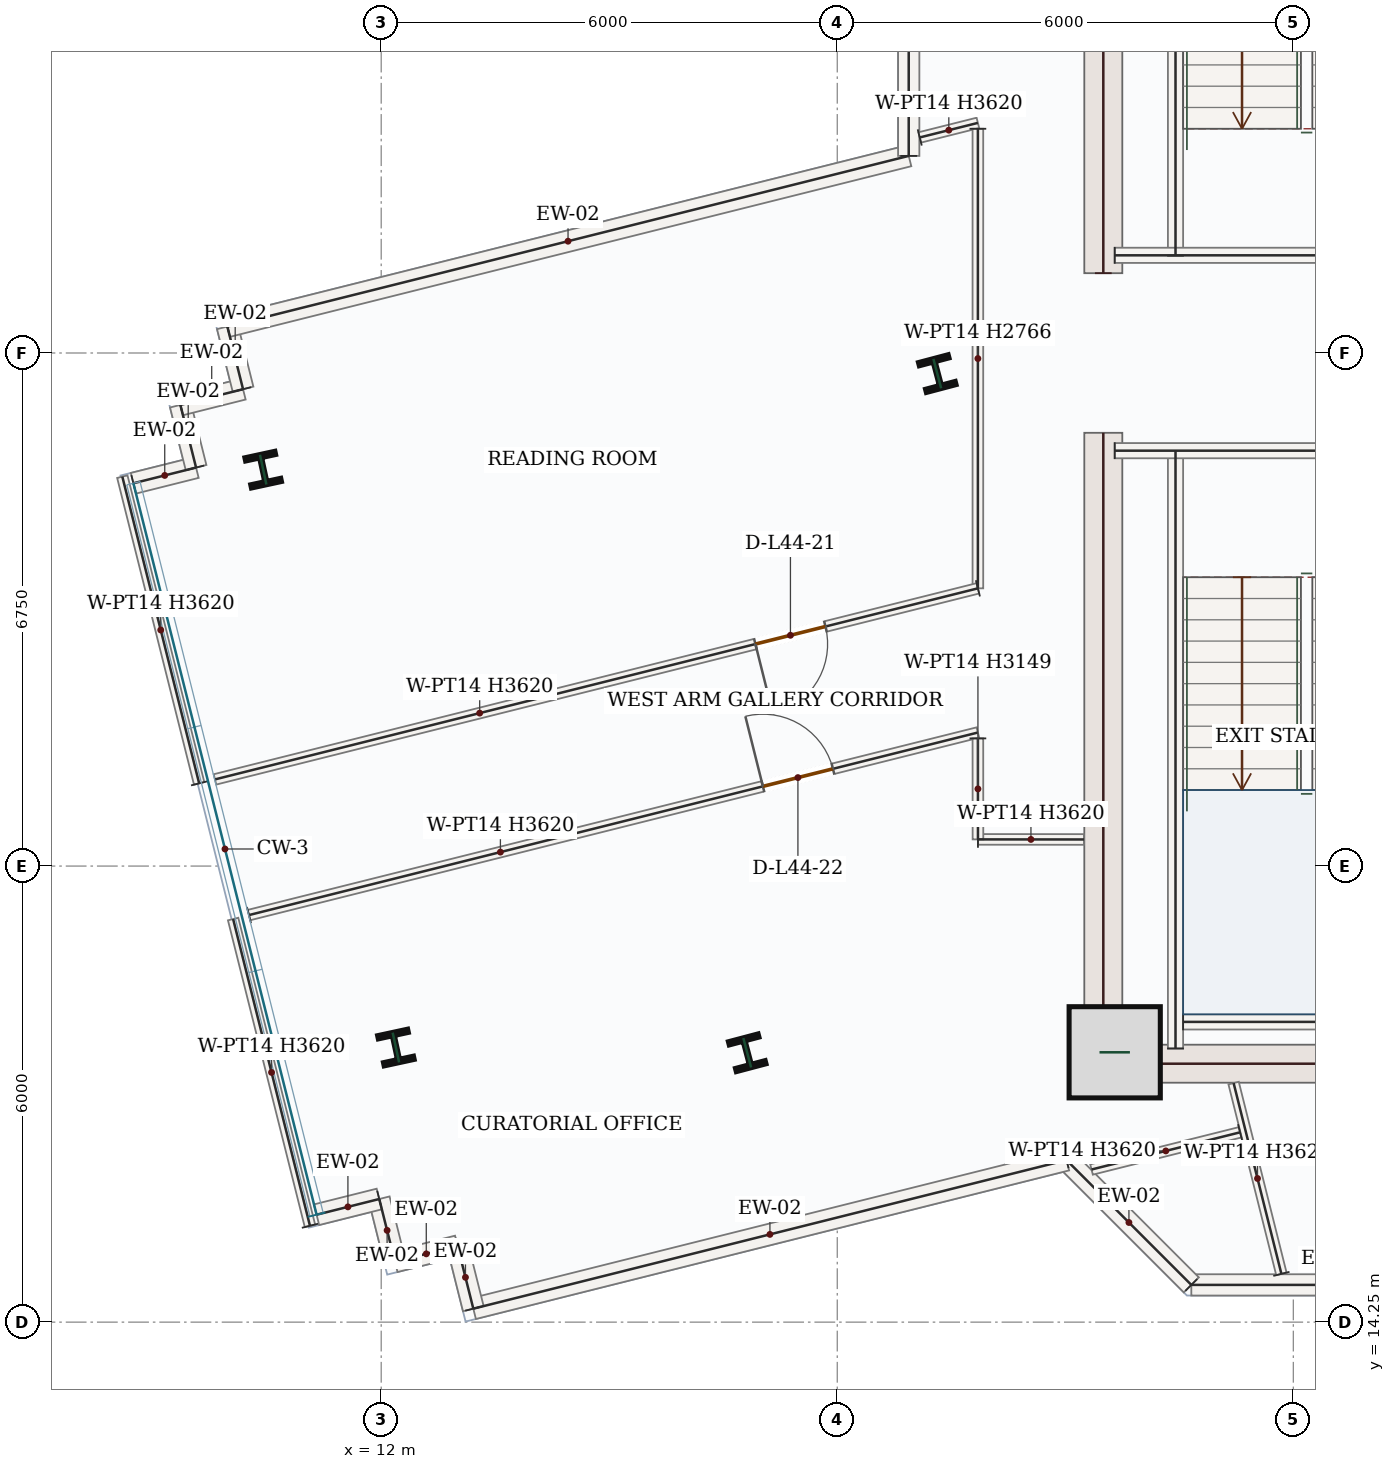
"""IFC4 building model, lengths in metres.
Left out: names, types, materials, properties, quantities, classifications, styles, units other than length and angle.
Written with IfcOpenShell. Run it as: python <this file> out.ifc"""

import sys

from ifc_helpers import new_model, si_unit, direction, frame, frame_2d, origin, origin_2d, place, context, subcontext, project, spatial, rectangle, i_section, extrude, source, transform, mapped, element, fill, save


model = new_model("IFC4")
c1 = context("Model", 3, precision=1e-05, world=origin(), true_north=direction((0.0, 1.0)))
c2 = subcontext(c1, "Body", "Model", "MODEL_VIEW")
j1 = project(units=[si_unit("LENGTHUNIT", "METRE"), si_unit("PLANEANGLEUNIT", "RADIAN")], contexts=[c1])
p1 = place(None, origin())
s1 = spatial("IfcSite", under=j1, at=p1, CompositionType="ELEMENT")
p2 = place(p1, origin())
s2 = spatial("IfcBuilding", under=s1, at=p2, CompositionType="ELEMENT")
p3 = place(p2, frame((0.0, 0.0, 190.2)))
s3 = spatial("IfcBuildingStorey", under=s2, at=p3, CompositionType="ELEMENT", Elevation=190.2)
m1 = source(origin(), c2, "Body", "SweptSolid", [
    extrude(rectangle(XDim=8.55, YDim=0.5, at=frame_2d((4.275, 0.0))), origin(), (0.0, 0.0, 1.0), 3.62),
])
for number, where, z_axis, x_axis in (
    (1, (21.5, 17.4, 0.0), (0.0, 0.0, 1.0), (0.0, 1.0, 0.0)),
    (2, (21.5, 28.05, 0.0), (0.0, 0.0, 1.0), (0.0, 1.0, 0.0)),
):
    element("IfcWall", number, at=place(p3, frame(where, z_axis=z_axis, x_axis=x_axis)), inside=s3, PredefinedType="SHEAR", context=c2, shape_type="MappedRepresentation", body=[
        mapped(m1, transform((0.0, 0.0, 0.0), x_axis=(1.0, 0.0, 0.0), y_axis=(0.0, 1.0, 0.0), z_axis=(0.0, 0.0, 1.0), scale=1.0)),
    ])
m2 = source(origin(), c2, "Body", "SweptSolid", [
    extrude(rectangle(XDim=7.0, YDim=0.5, at=frame_2d((3.5, 0.0))), origin(), (0.0, 0.0, 1.0), 3.62),
])
p4 = place(p3, frame((21.75, 17.65, 0.0), z_axis=(0.0, 0.0, 1.0), x_axis=(1.0, 0.0, 0.0)))
e3 = element("IfcWall", 3, at=p4, inside=s3, PredefinedType="SHEAR", context=c2, shape_type="MappedRepresentation", body=[
    mapped(m2, transform((0.0, 0.0, 0.0), x_axis=(1.0, 0.0, 0.0), y_axis=(0.0, 1.0, 0.0), z_axis=(0.0, 0.0, 1.0), scale=1.0)),
])
m3 = source(origin(), c2, "Body", "SweptSolid", [
    extrude(rectangle(XDim=1.2, YDim=1.2, at=origin_2d()), origin(), (0.0, 0.0, 1.0), 3.9),
])
p5 = place(p3, frame((21.65, 17.8, 0.0), z_axis=(0.0, 0.0, 1.0), x_axis=(1.0, 0.0, 0.0)))
e4 = element("IfcColumn", 4, at=p5, inside=s3, PredefinedType="COLUMN", context=c2, shape_type="MappedRepresentation", body=[
    mapped(m3, transform((0.0, 0.0, 0.0), x_axis=(1.0, 0.0, 0.0), y_axis=(0.0, 1.0, 0.0), z_axis=(0.0, 0.0, 1.0), scale=1.0)),
])
m4 = source(origin(), c2, "Body", "SweptSolid", [
    extrude(i_section(OverallWidth=0.404, OverallDepth=0.407, WebThickness=0.027, FlangeThickness=0.044, FilletRadius=0.018, at=origin_2d()), origin(), (0.0, 0.0, 1.0), 3.9),
])
for number, where, z_axis, x_axis in (
    (5, (19.316, 26.729, 0.0), (0.0, 0.0, 1.0), (0.967, 0.255, 0.0)),
    (6, (16.815, 17.794, 0.0), (0.0, 0.0, 1.0), (0.967, 0.255, 0.0)),
    (7, (10.447, 25.465, 0.0), (0.0, 0.0, 1.0), (0.977, 0.211, 0.0)),
    (8, (12.193, 17.863, 0.0), (0.0, 0.0, 1.0), (0.977, 0.211, 0.0)),
):
    element("IfcColumn", number, at=place(p3, frame(where, z_axis=z_axis, x_axis=x_axis)), inside=s3, PredefinedType="COLUMN", context=c2, shape_type="MappedRepresentation", body=[
        mapped(m4, transform((0.0, 0.0, 0.0), x_axis=(1.0, 0.0, 0.0), y_axis=(0.0, 1.0, 0.0), z_axis=(0.0, 0.0, 1.0), scale=1.0)),
    ])
p6 = place(p3, frame((32.205, 14.74, 0.0), z_axis=(0.0, 0.0, 1.0), x_axis=(-1.0, 0.0, 0.0)))
e9 = element("IfcWall", 9, at=p6, inside=s3, PredefinedType="SOLIDWALL", context=c2, shape_type="SweptSolid", body=[
    extrude(rectangle(XDim=9.547, YDim=0.28, at=frame_2d((4.773, 0.0))), origin(), (0.0, 0.0, 1.0), 3.62),
])
p7 = place(p6, frame((3.873, 0.0, 0.85)))
e10 = element("IfcOpeningElement", 10, at=p7, cuts=e9, PredefinedType="OPENING", context=c2, shape_type="SweptSolid", body=[
    extrude(rectangle(XDim=1.8, YDim=1.75, at=frame_2d((0.9, 0.875))), frame((0.0, 0.15, 0.0), z_axis=(0.0, -1.0, 0.0), x_axis=(1.0, 0.0, 0.0)), (0.0, 0.0, 1.0), 0.3),
])
m5 = source(origin(), c2, "Body", "SweptSolid", [
    extrude(rectangle(XDim=2.322, YDim=0.28, at=frame_2d((1.161, 0.0))), origin(), (0.0, 0.0, 1.0), 3.62),
])
p8 = place(p3, frame((22.658, 14.74, 0.0), z_axis=(0.0, 0.0, 1.0), x_axis=(-0.707106781187, 0.707106781187, 0.0)))
e11 = element("IfcWall", 11, at=p8, inside=s3, PredefinedType="SOLIDWALL", context=c2, shape_type="MappedRepresentation", body=[
    mapped(m5, transform((0.0, 0.0, 0.0), x_axis=(1.0, 0.0, 0.0), y_axis=(0.0, 1.0, 0.0), z_axis=(0.0, 0.0, 1.0), scale=1.0)),
])
m6 = source(origin(), c2, "Body", "SweptSolid", [
    extrude(rectangle(XDim=8.045, YDim=0.28, at=frame_2d((4.023, 0.0))), origin(), (0.0, 0.0, 1.0), 3.62),
])
p9 = place(p3, frame((21.016, 16.382, 0.0), z_axis=(0.0, 0.0, 1.0), x_axis=(-0.970040669564, -0.242942584557, 0.0)))
e12 = element("IfcWall", 12, at=p9, inside=s3, PredefinedType="SOLIDWALL", context=c2, shape_type="MappedRepresentation", body=[
    mapped(m6, transform((0.0, 0.0, 0.0), x_axis=(1.0, 0.0, 0.0), y_axis=(0.0, 1.0, 0.0), z_axis=(0.0, 0.0, 1.0), scale=1.0)),
])
m7 = source(origin(), c2, "Body", "SweptSolid", [
    extrude(rectangle(XDim=0.85, YDim=0.28, at=frame_2d((0.425, 0.0))), origin(), (0.0, 0.0, 1.0), 3.62),
])
for number, where, z_axis, x_axis in (
    (13, (13.212, 14.427, 0.0), (0.0, 0.0, 1.0), (-0.243, 0.97, 0.0)),
    (14, (13.005, 15.252, 0.0), (0.0, 0.0, 1.0), (-0.97, -0.243, 0.0)),
):
    element("IfcWall", number, at=place(p3, frame(where, z_axis=z_axis, x_axis=x_axis)), inside=s3, PredefinedType="SOLIDWALL", context=c2, shape_type="MappedRepresentation", body=[
        mapped(m7, transform((0.0, 0.0, 0.0), x_axis=(1.0, 0.0, 0.0), y_axis=(0.0, 1.0, 0.0), z_axis=(0.0, 0.0, 1.0), scale=1.0)),
    ])
m8 = source(origin(), c2, "Body", "SweptSolid", [
    extrude(rectangle(XDim=0.85, YDim=0.28, at=frame_2d((0.425, 0.0))), origin(), (0.0, 0.0, 1.0), 3.62),
])
p10 = place(p3, frame((12.181, 15.045, 0.0), z_axis=(0.0, 0.0, 1.0), x_axis=(-0.242941012307, 0.970041063326, 0.0)))
e15 = element("IfcWall", 15, at=p10, inside=s3, PredefinedType="SOLIDWALL", context=c2, shape_type="MappedRepresentation", body=[
    mapped(m8, transform((0.0, 0.0, 0.0), x_axis=(1.0, 0.0, 0.0), y_axis=(0.0, 1.0, 0.0), z_axis=(0.0, 0.0, 1.0), scale=1.0)),
])
for number, where, z_axis, x_axis in (
    (16, (11.974, 15.87, 0.0), (0.0, 0.0, 1.0), (-0.97, -0.243, 0.0)),
    (17, (8.74, 25.286, 0.0), (0.0, 0.0, 1.0), (0.97, 0.243, 0.0)),
    (18, (9.564, 25.493, 0.0), (0.0, 0.0, 1.0), (-0.243, 0.97, 0.0)),
):
    element("IfcWall", number, at=place(p3, frame(where, z_axis=z_axis, x_axis=x_axis)), inside=s3, PredefinedType="SOLIDWALL", context=c2, shape_type="MappedRepresentation", body=[
        mapped(m7, transform((0.0, 0.0, 0.0), x_axis=(1.0, 0.0, 0.0), y_axis=(0.0, 1.0, 0.0), z_axis=(0.0, 0.0, 1.0), scale=1.0)),
    ])
p11 = place(p3, frame((9.358, 26.317, 0.0), z_axis=(0.0, 0.0, 1.0), x_axis=(0.970041063326, 0.242941012307, 0.0)))
e19 = element("IfcWall", 19, at=p11, inside=s3, PredefinedType="SOLIDWALL", context=c2, shape_type="MappedRepresentation", body=[
    mapped(m8, transform((0.0, 0.0, 0.0), x_axis=(1.0, 0.0, 0.0), y_axis=(0.0, 1.0, 0.0), z_axis=(0.0, 0.0, 1.0), scale=1.0)),
])
p12 = place(p3, frame((10.182, 26.524, 0.0), z_axis=(0.0, 0.0, 1.0), x_axis=(-0.243008704507, 0.970024107708, 0.0)))
e20 = element("IfcWall", 20, at=p12, inside=s3, PredefinedType="SOLIDWALL", context=c2, shape_type="MappedRepresentation", body=[
    mapped(m7, transform((0.0, 0.0, 0.0), x_axis=(1.0, 0.0, 0.0), y_axis=(0.0, 1.0, 0.0), z_axis=(0.0, 0.0, 1.0), scale=1.0)),
])
m9 = source(origin(), c2, "Body", "SweptSolid", [
    extrude(rectangle(XDim=9.241, YDim=0.28, at=frame_2d((4.621, 0.0))), origin(), (0.0, 0.0, 1.0), 3.62),
])
p13 = place(p3, frame((9.976, 27.348, 0.0), z_axis=(0.0, 0.0, 1.0), x_axis=(0.970044513566, 0.242927235402, 0.0)))
e21 = element("IfcWall", 21, at=p13, inside=s3, PredefinedType="SOLIDWALL", context=c2, shape_type="MappedRepresentation", body=[
    mapped(m9, transform((0.0, 0.0, 0.0), x_axis=(1.0, 0.0, 0.0), y_axis=(0.0, 1.0, 0.0), z_axis=(0.0, 0.0, 1.0), scale=1.0)),
])
m10 = source(origin(), c2, "Body", "SweptSolid", [
    extrude(rectangle(XDim=5.949, YDim=0.28, at=frame_2d((2.975, 0.0))), origin(), (0.0, 0.0, 1.0), 3.62),
])
p14 = place(p3, frame((18.94, 29.593, 0.0), z_axis=(0.0, 0.0, 1.0), x_axis=(0.0, 1.0, 0.0)))
e22 = element("IfcWall", 22, at=p14, inside=s3, PredefinedType="SOLIDWALL", context=c2, shape_type="MappedRepresentation", body=[
    mapped(m10, transform((0.0, 0.0, 0.0), x_axis=(1.0, 0.0, 0.0), y_axis=(0.0, 1.0, 0.0), z_axis=(0.0, 0.0, 1.0), scale=1.0)),
])
m11 = source(origin(), c2, "Body", "SweptSolid", [
    extrude(rectangle(XDim=7.87, YDim=0.2, at=frame_2d((3.935, 0.0))), origin(), (0.0, 0.0, 1.0), 3.62),
])
for number, where, z_axis, x_axis in (
    (23, (22.45, 17.85, 0.0), (0.0, 0.0, 1.0), (0.0, 1.0, 0.0)),
    (24, (22.45, 28.28, 0.0), (0.0, 0.0, 1.0), (0.0, 1.0, 0.0)),
):
    element("IfcWall", number, at=place(p3, frame(where, z_axis=z_axis, x_axis=x_axis)), inside=s3, PredefinedType="SOLIDWALL", context=c2, shape_type="MappedRepresentation", body=[
        mapped(m11, transform((0.0, 0.0, 0.0), x_axis=(1.0, 0.0, 0.0), y_axis=(0.0, 1.0, 0.0), z_axis=(0.0, 0.0, 1.0), scale=1.0)),
    ])
m12 = source(origin(), c2, "Body", "SweptSolid", [
    extrude(rectangle(XDim=4.25, YDim=0.2, at=frame_2d((2.125, 0.0))), origin(), (0.0, 0.0, 1.0), 3.62),
])
for number, where, z_axis, x_axis in (
    (25, (21.65, 25.715, 0.0), (0.0, 0.0, 1.0), (1.0, 0.0, 0.0)),
    (26, (21.65, 28.285, 0.0), (0.0, 0.0, 1.0), (1.0, 0.0, 0.0)),
):
    element("IfcWall", number, at=place(p3, frame(where, z_axis=z_axis, x_axis=x_axis)), inside=s3, PredefinedType="SOLIDWALL", context=c2, shape_type="MappedRepresentation", body=[
        mapped(m12, transform((0.0, 0.0, 0.0), x_axis=(1.0, 0.0, 0.0), y_axis=(0.0, 1.0, 0.0), z_axis=(0.0, 0.0, 1.0), scale=1.0)),
    ])
m13 = source(origin(), c2, "Body", "SweptSolid", [
    extrude(rectangle(XDim=3.25, YDim=0.2, at=frame_2d((1.625, 0.0))), origin(), (0.0, 0.0, 1.0), 3.62),
])
p15 = place(p3, frame((22.55, 18.2, 0.0), z_axis=(0.0, 0.0, 1.0), x_axis=(1.0, 0.0, 0.0)))
e27 = element("IfcWall", 27, at=p15, inside=s3, PredefinedType="SOLIDWALL", context=c2, shape_type="MappedRepresentation", body=[
    mapped(m13, transform((0.0, 0.0, 0.0), x_axis=(1.0, 0.0, 0.0), y_axis=(0.0, 1.0, 0.0), z_axis=(0.0, 0.0, 1.0), scale=1.0)),
])
m14 = source(origin(), c2, "Body", "SweptSolid", [
    extrude(rectangle(XDim=2.588, YDim=0.14, at=frame_2d((1.294, 0.0))), origin(), (0.0, 0.0, 1.0), 3.62),
])
p16 = place(p3, frame((23.843, 14.885, 0.0), z_axis=(0.0, 0.0, 1.0), x_axis=(-0.242957412811, 0.97003695577, 0.0)))
e28 = element("IfcWall", 28, at=p16, inside=s3, PredefinedType="PARTITIONING", context=c2, shape_type="MappedRepresentation", body=[
    mapped(m14, transform((0.0, 0.0, 0.0), x_axis=(1.0, 0.0, 0.0), y_axis=(0.0, 1.0, 0.0), z_axis=(0.0, 0.0, 1.0), scale=1.0)),
])
m15 = source(origin(), c2, "Body", "SweptSolid", [
    extrude(rectangle(XDim=1.394, YDim=0.14, at=frame_2d((0.697, 0.0))), origin(), (0.0, 0.0, 1.0), 3.62),
])
p17 = place(p3, frame((19.851, 20.601, 0.0), z_axis=(0.0, 0.0, 1.0), x_axis=(0.999999754632, -0.000700525222, 0.0)))
e29 = element("IfcWall", 29, at=p17, inside=s3, PredefinedType="PARTITIONING", context=c2, shape_type="MappedRepresentation", body=[
    mapped(m15, transform((0.0, 0.0, 0.0), x_axis=(1.0, 0.0, 0.0), y_axis=(0.0, 1.0, 0.0), z_axis=(0.0, 0.0, 1.0), scale=1.0)),
])
m16 = source(origin(), c2, "Body", "SweptSolid", [
    extrude(rectangle(XDim=2.014, YDim=0.14, at=frame_2d((1.007, 0.0))), origin(), (0.0, 0.0, 1.0), 3.62),
])
p18 = place(p3, frame((23.299, 16.747, 0.0), z_axis=(0.0, 0.0, 1.0), x_axis=(-0.970056889313, -0.242877811867, 0.0)))
e30 = element("IfcWall", 30, at=p18, inside=s3, PredefinedType="PARTITIONING", context=c2, shape_type="MappedRepresentation", body=[
    mapped(m16, transform((0.0, 0.0, 0.0), x_axis=(1.0, 0.0, 0.0), y_axis=(0.0, 1.0, 0.0), z_axis=(0.0, 0.0, 1.0), scale=1.0)),
])
m17 = source(origin(), c2, "Body", "SweptSolid", [
    extrude(rectangle(XDim=4.16, YDim=0.14, at=frame_2d((2.08, 0.0))), origin(), (0.0, 0.0, 1.0), 3.62),
])
p19 = place(p3, frame((11.062, 15.518, 0.0), z_axis=(0.0, 0.0, 1.0), x_axis=(-0.242963670411, 0.970035388458, 0.0)))
e31 = element("IfcWall", 31, at=p19, inside=s3, PredefinedType="PARTITIONING", context=c2, shape_type="MappedRepresentation", body=[
    mapped(m17, transform((0.0, 0.0, 0.0), x_axis=(1.0, 0.0, 0.0), y_axis=(0.0, 1.0, 0.0), z_axis=(0.0, 0.0, 1.0), scale=1.0)),
])
p20 = place(p3, frame((10.26, 19.605, 0.0), z_axis=(0.0, 0.0, 1.0), x_axis=(0.970042179759, 0.242936554451, 0.0)))
e32 = element("IfcWall", 32, at=p20, inside=s3, PredefinedType="PARTITIONING", context=c2, shape_type="SweptSolid", body=[
    extrude(rectangle(XDim=9.886, YDim=0.14, at=frame_2d((4.943, 0.0))), origin(), (0.0, 0.0, 1.0), 3.62),
])
p21 = place(p20, frame((6.97, 0.0, 0.0)))
e33 = element("IfcOpeningElement", 33, at=p21, cuts=e32, PredefinedType="OPENING", context=c2, shape_type="SweptSolid", body=[
    extrude(rectangle(XDim=0.95, YDim=2.15, at=frame_2d((0.475, 1.075))), frame((0.0, 0.08, 0.0), z_axis=(0.0, -1.0, 0.0), x_axis=(1.0, 0.0, 0.0)), (0.0, 0.0, 1.0), 0.16),
])
m18 = source(origin(), c2, "Body", "SweptSolid", [
    extrude(rectangle(XDim=1.329, YDim=0.14, at=frame_2d((0.664, 0.0))), origin(), (0.0, 0.0, 1.0), 3.149),
])
p22 = place(p3, frame((19.85, 21.93, 0.0), z_axis=(0.0, 0.0, 1.0), x_axis=(0.00073502369, -0.99999972987, 0.0)))
e34 = element("IfcWall", 34, at=p22, inside=s3, PredefinedType="PARTITIONING", context=c2, shape_type="MappedRepresentation", body=[
    mapped(m18, transform((0.0, 0.0, 0.0), x_axis=(1.0, 0.0, 0.0), y_axis=(0.0, 1.0, 0.0), z_axis=(0.0, 0.0, 1.0), scale=1.0)),
])
p23 = place(p3, frame((9.605, 21.338, 0.0), z_axis=(0.0, 0.0, 1.0), x_axis=(-0.242963670411, 0.970035388458, 0.0)))
e35 = element("IfcWall", 35, at=p23, inside=s3, PredefinedType="PARTITIONING", context=c2, shape_type="MappedRepresentation", body=[
    mapped(m17, transform((0.0, 0.0, 0.0), x_axis=(1.0, 0.0, 0.0), y_axis=(0.0, 1.0, 0.0), z_axis=(0.0, 0.0, 1.0), scale=1.0)),
])
m19 = source(origin(), c2, "Body", "SweptSolid", [
    extrude(rectangle(XDim=0.789, YDim=0.14, at=frame_2d((0.395, 0.0))), origin(), (0.0, 0.0, 1.0), 3.62),
])
p24 = place(p3, frame((19.085, 29.836, 0.0), z_axis=(0.0, 0.0, 1.0), x_axis=(0.970033159667, 0.242972568711, 0.0)))
e36 = element("IfcWall", 36, at=p24, inside=s3, PredefinedType="PARTITIONING", context=c2, shape_type="MappedRepresentation", body=[
    mapped(m19, transform((0.0, 0.0, 0.0), x_axis=(1.0, 0.0, 0.0), y_axis=(0.0, 1.0, 0.0), z_axis=(0.0, 0.0, 1.0), scale=1.0)),
])
m20 = source(origin(), c2, "Body", "SweptSolid", [
    extrude(rectangle(XDim=6.046, YDim=0.14, at=frame_2d((3.023, 0.0))), origin(), (0.0, 0.0, 1.0), 2.766),
])
p25 = place(p3, frame((19.85, 29.95, 0.0), z_axis=(0.0, 0.0, 1.0), x_axis=(0.0, -1.0, 0.0)))
e37 = element("IfcWall", 37, at=p25, inside=s3, PredefinedType="PARTITIONING", context=c2, shape_type="MappedRepresentation", body=[
    mapped(m20, transform((0.0, 0.0, 0.0), x_axis=(1.0, 0.0, 0.0), y_axis=(0.0, 1.0, 0.0), z_axis=(0.0, 0.0, 1.0), scale=1.0)),
])
p26 = place(p3, frame((19.85, 23.904, 0.0), z_axis=(0.0, 0.0, 1.0), x_axis=(-0.97004665335, -0.24291869077, 0.0)))
e38 = element("IfcWall", 38, at=p26, inside=s3, PredefinedType="PARTITIONING", context=c2, shape_type="SweptSolid", body=[
    extrude(rectangle(XDim=10.347, YDim=0.14, at=frame_2d((5.173, 0.0))), origin(), (0.0, 0.0, 1.0), 3.62),
])
p27 = place(p26, frame((2.067, 0.0, 0.0)))
e39 = element("IfcOpeningElement", 39, at=p27, cuts=e38, PredefinedType="OPENING", context=c2, shape_type="SweptSolid", body=[
    extrude(rectangle(XDim=0.95, YDim=2.15, at=frame_2d((0.475, 1.075))), frame((0.0, 0.08, 0.0), z_axis=(0.0, -1.0, 0.0), x_axis=(1.0, 0.0, 0.0)), (0.0, 0.0, 1.0), 0.16),
])
m21 = source(origin(), c2, "Body", "SweptSolid", [
    extrude(rectangle(XDim=0.95, YDim=2.15, at=frame_2d((0.475, 1.075))), frame((0.0, 0.025, 0.0), z_axis=(0.0, -1.0, 0.0), x_axis=(1.0, 0.0, 0.0)), (0.0, 0.0, 1.0), 0.05),
])
p28 = place(p27, origin())
e40 = element("IfcDoor", 40, at=p28, inside=s3, OperationType="SINGLE_SWING_RIGHT", PredefinedType="DOOR", context=c2, shape_type="MappedRepresentation", body=[
    mapped(m21, transform((0.0, 0.0, 0.0), x_axis=(1.0, 0.0, 0.0), y_axis=(0.0, 1.0, 0.0), z_axis=(0.0, 0.0, 1.0), scale=1.0)),
])
fill(e39, e40)
p29 = place(p21, origin())
e41 = element("IfcDoor", 41, at=p29, inside=s3, OperationType="SINGLE_SWING_LEFT", PredefinedType="DOOR", context=c2, shape_type="MappedRepresentation", body=[
    mapped(m21, transform((0.0, 0.0, 0.0), x_axis=(1.0, 0.0, 0.0), y_axis=(0.0, 1.0, 0.0), z_axis=(0.0, 0.0, 1.0), scale=1.0)),
])
fill(e33, e41)
save(model, sys.argv[1])
